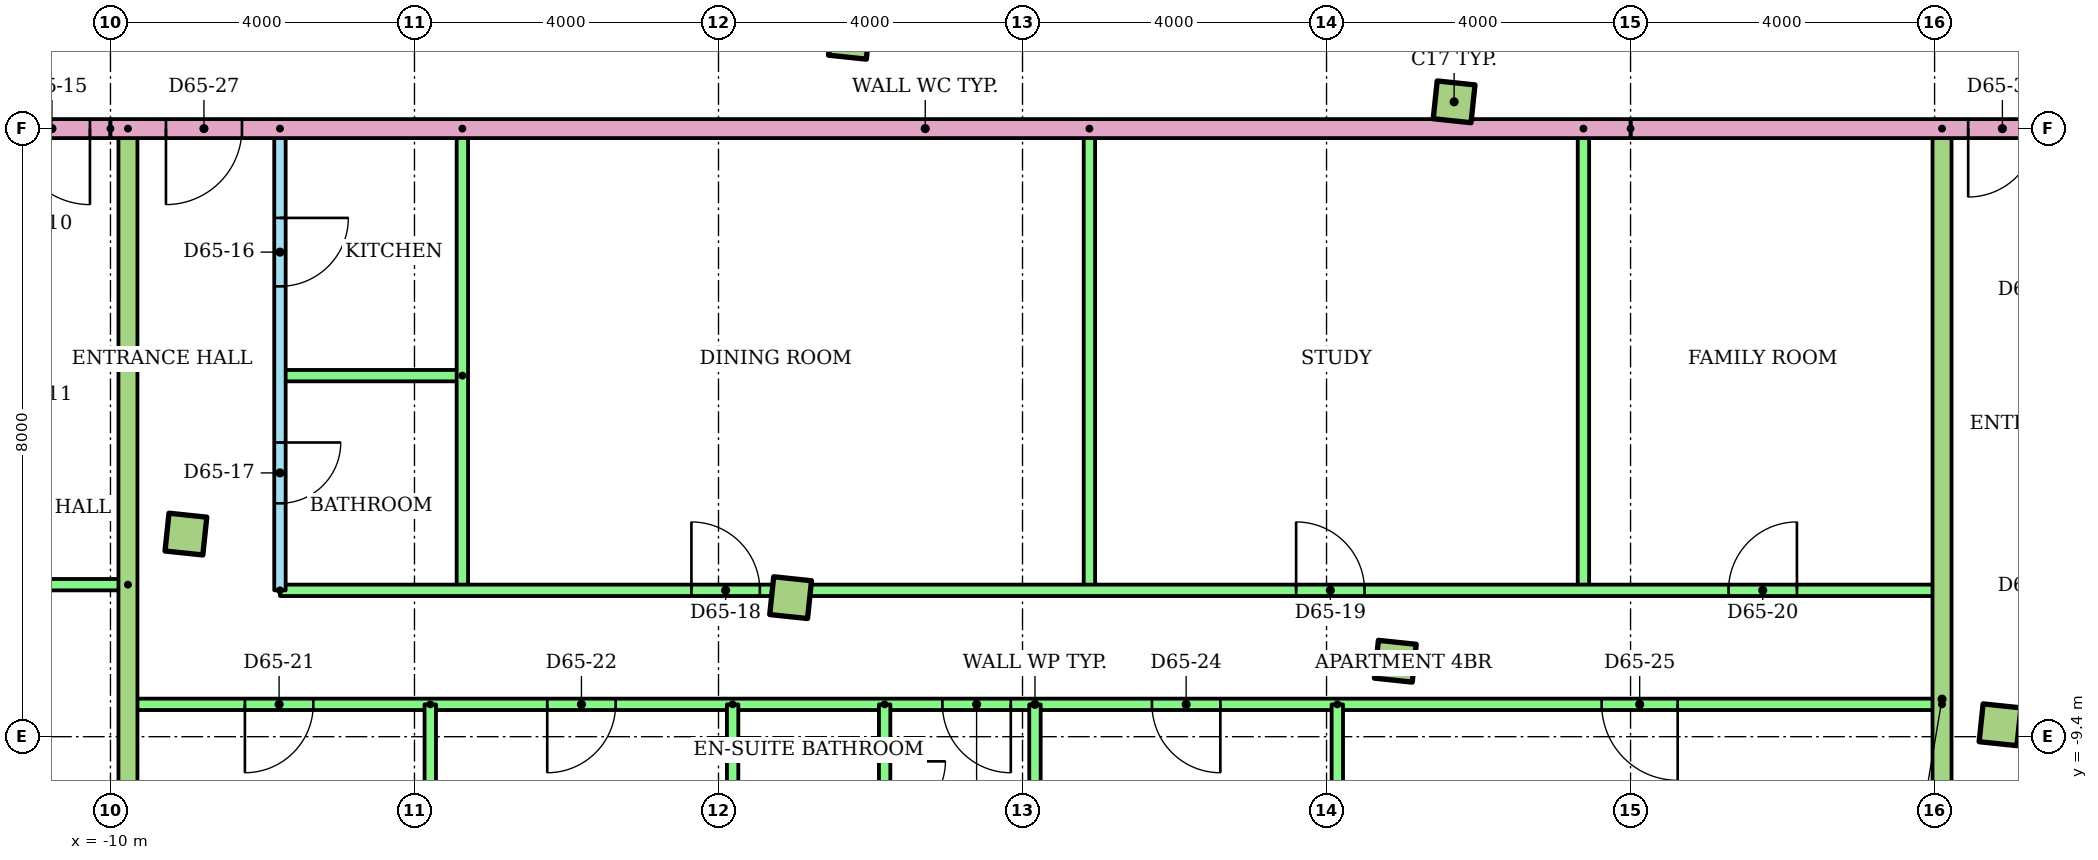
"""IFC4 building model, lengths in metres.
Left out: names, types, materials, properties, quantities, classifications, styles, units other than length and angle.
Written with IfcOpenShell. Run it as: python <this file> out.ifc"""

import sys

from ifc_helpers import new_model, si_unit, direction, frame, frame_2d, origin, origin_2d, place, context, subcontext, project, spatial, rectangle, extrude, element, fill, save


model = new_model("IFC4")
c1 = context("Model", 3, precision=1e-05, world=origin(), true_north=direction((0.0, 1.0)))
c2 = subcontext(c1, "Body", "Model", "MODEL_VIEW")
j1 = project(units=[si_unit("LENGTHUNIT", "METRE"), si_unit("PLANEANGLEUNIT", "RADIAN")], contexts=[c1])
p1 = place(None, origin())
s1 = spatial("IfcSite", under=j1, at=p1, CompositionType="ELEMENT")
p2 = place(p1, origin())
s2 = spatial("IfcBuilding", under=s1, at=p2, CompositionType="ELEMENT")
p3 = place(p2, frame((0.0, 0.0, 253.1)))
s3 = spatial("IfcBuildingStorey", under=s2, at=p3, CompositionType="ELEMENT", Elevation=253.1)
for number, where, z_axis, x_axis in (
    (1, (-9.007, -6.735, 0.0), (0.0, 0.0, 1.0), (0.995, -0.105, 0.0)),
    (2, (-1.051, -7.571, 0.0), (0.0, 0.0, 1.0), (0.995, -0.105, 0.0)),
    (3, (6.905, -8.407, 0.0), (0.0, 0.0, 1.0), (0.995, -0.105, 0.0)),
    (4, (14.861, -9.243, 0.0), (0.0, 0.0, 1.0), (0.995, -0.105, 0.0)),
    (5, (-0.278, -0.211, 0.0), (0.0, 0.0, 1.0), (0.995, -0.105, 0.0)),
    (6, (7.678, -1.048, 0.0), (0.0, 0.0, 1.0), (0.995, -0.105, 0.0)),
):
    element("IfcColumn", number, at=place(p3, frame(where, z_axis=z_axis, x_axis=x_axis)), inside=s3, PredefinedType="COLUMN", context=c2, shape_type="SweptSolid", body=[
        extrude(rectangle(XDim=0.5, YDim=0.5, at=origin_2d()), origin(), (0.0, 0.0, 1.0), 3.2),
    ])
p4 = place(p3, frame((-9.77, -7.4, 0.0), z_axis=(0.0, 0.0, 1.0), x_axis=(-1.0, 0.0, 0.0)))
e7 = element("IfcWall", 7, at=p4, inside=s3, PredefinedType="PARTITIONING", context=c2, shape_type="SweptSolid", body=[
    extrude(rectangle(XDim=14.411, YDim=0.15, at=frame_2d((7.206, 0.0))), origin(), (0.0, 0.0, 1.0), 2.4),
])
p5 = place(p4, frame((5.789, 0.0, 0.0)))
e8 = element("IfcOpeningElement", 8, at=p5, cuts=e7, PredefinedType="OPENING", context=c2, shape_type="SweptSolid", body=[
    extrude(rectangle(XDim=1.0, YDim=2.1, at=frame_2d((0.5, 1.05))), frame((0.0, 0.085, 0.0), z_axis=(0.0, -1.0, 0.0), x_axis=(1.0, 0.0, 0.0)), (0.0, 0.0, 1.0), 0.17),
])
p6 = place(p3, frame((-7.77, -1.4, 0.0), z_axis=(0.0, 0.0, 1.0), x_axis=(0.0, -1.0, 0.0)))
e9 = element("IfcWall", 9, at=p6, inside=s3, PredefinedType="PARTITIONING", context=c2, shape_type="SweptSolid", body=[
    extrude(rectangle(XDim=6.075, YDim=0.15, at=frame_2d((3.037, 0.0))), origin(), (0.0, 0.0, 1.0), 2.4),
])
p7 = place(p6, frame((1.175, 0.0, 0.0)))
e10 = element("IfcOpeningElement", 10, at=p7, cuts=e9, PredefinedType="OPENING", context=c2, shape_type="SweptSolid", body=[
    extrude(rectangle(XDim=0.9, YDim=2.1, at=frame_2d((0.45, 1.05))), frame((0.0, 0.085, 0.0), z_axis=(0.0, -1.0, 0.0), x_axis=(1.0, 0.0, 0.0)), (0.0, 0.0, 1.0), 0.17),
])
p8 = place(p6, frame((4.13, 0.0, 0.0)))
e11 = element("IfcOpeningElement", 11, at=p8, cuts=e9, PredefinedType="OPENING", context=c2, shape_type="SweptSolid", body=[
    extrude(rectangle(XDim=0.8, YDim=2.1, at=frame_2d((0.4, 1.05))), frame((0.0, 0.085, 0.0), z_axis=(0.0, -1.0, 0.0), x_axis=(1.0, 0.0, 0.0)), (0.0, 0.0, 1.0), 0.17),
])
p9 = place(p3, frame((-5.37, -4.65, 0.0), z_axis=(0.0, 0.0, 1.0), x_axis=(-1.0, 0.0, 0.0)))
e12 = element("IfcWall", 12, at=p9, inside=s3, PredefinedType="PARTITIONING", context=c2, shape_type="SweptSolid", body=[
    extrude(rectangle(XDim=2.4, YDim=0.15, at=frame_2d((1.2, 0.0))), origin(), (0.0, 0.0, 1.0), 2.4),
])
for number, where, z_axis, x_axis in (
    (13, (-5.37, -1.4, 0.0), (0.0, 0.0, 1.0), (0.0, -1.0, 0.0)),
    (14, (2.88, -1.4, 0.0), (0.0, 0.0, 1.0), (0.0, -1.0, 0.0)),
    (15, (9.38, -1.4, 0.0), (0.0, 0.0, 1.0), (0.0, -1.0, 0.0)),
):
    element("IfcWall", number, at=place(p3, frame(where, z_axis=z_axis, x_axis=x_axis)), inside=s3, PredefinedType="PARTITIONING", context=c2, shape_type="SweptSolid", body=[
        extrude(rectangle(XDim=6.075, YDim=0.15, at=frame_2d((3.037, 0.0))), origin(), (0.0, 0.0, 1.0), 2.4),
    ])
p10 = place(p3, frame((-7.77, -7.475, 0.0)))
e16 = element("IfcWall", 16, at=p10, inside=s3, PredefinedType="PARTITIONING", context=c2, shape_type="SweptSolid", body=[
    extrude(rectangle(XDim=21.868, YDim=0.15, at=frame_2d((10.934, 0.0))), origin(), (0.0, 0.0, 1.0), 2.4),
])
p11 = place(p10, frame((5.414, 0.0, 0.0)))
e17 = element("IfcOpeningElement", 17, at=p11, cuts=e16, PredefinedType="OPENING", context=c2, shape_type="SweptSolid", body=[
    extrude(rectangle(XDim=0.9, YDim=2.1, at=frame_2d((0.45, 1.05))), frame((0.0, 0.085, 0.0), z_axis=(0.0, -1.0, 0.0), x_axis=(1.0, 0.0, 0.0)), (0.0, 0.0, 1.0), 0.17),
])
p12 = place(p10, frame((13.37, 0.0, 0.0)))
e18 = element("IfcOpeningElement", 18, at=p12, cuts=e16, PredefinedType="OPENING", context=c2, shape_type="SweptSolid", body=[
    extrude(rectangle(XDim=0.9, YDim=2.1, at=frame_2d((0.45, 1.05))), frame((0.0, 0.085, 0.0), z_axis=(0.0, -1.0, 0.0), x_axis=(1.0, 0.0, 0.0)), (0.0, 0.0, 1.0), 0.17),
])
p13 = place(p10, frame((19.059, 0.0, 0.0)))
e19 = element("IfcOpeningElement", 19, at=p13, cuts=e16, PredefinedType="OPENING", context=c2, shape_type="SweptSolid", body=[
    extrude(rectangle(XDim=0.9, YDim=2.1, at=frame_2d((0.45, 1.05))), frame((0.0, 0.085, 0.0), z_axis=(0.0, -1.0, 0.0), x_axis=(1.0, 0.0, 0.0)), (0.0, 0.0, 1.0), 0.17),
])
p14 = place(p3, frame((14.098, -8.975, 0.0), z_axis=(0.0, 0.0, 1.0), x_axis=(-1.0, 0.0, 0.0)))
e20 = element("IfcWall", 20, at=p14, inside=s3, PredefinedType="PARTITIONING", context=c2, shape_type="SweptSolid", body=[
    extrude(rectangle(XDim=23.868, YDim=0.15, at=frame_2d((11.934, 0.0))), origin(), (0.0, 0.0, 1.0), 2.4),
])
p15 = place(p14, frame((21.429, 0.0, 0.0)))
e21 = element("IfcOpeningElement", 21, at=p15, cuts=e20, PredefinedType="OPENING", context=c2, shape_type="SweptSolid", body=[
    extrude(rectangle(XDim=0.9, YDim=2.1, at=frame_2d((0.45, 1.05))), frame((0.0, 0.085, 0.0), z_axis=(0.0, -1.0, 0.0), x_axis=(1.0, 0.0, 0.0)), (0.0, 0.0, 1.0), 0.17),
])
p16 = place(p14, frame((17.451, 0.0, 0.0)))
e22 = element("IfcOpeningElement", 22, at=p16, cuts=e20, PredefinedType="OPENING", context=c2, shape_type="SweptSolid", body=[
    extrude(rectangle(XDim=0.9, YDim=2.1, at=frame_2d((0.45, 1.05))), frame((0.0, 0.085, 0.0), z_axis=(0.0, -1.0, 0.0), x_axis=(1.0, 0.0, 0.0)), (0.0, 0.0, 1.0), 0.17),
])
p17 = place(p14, frame((12.252, 0.0, 0.0)))
e23 = element("IfcOpeningElement", 23, at=p17, cuts=e20, PredefinedType="OPENING", context=c2, shape_type="SweptSolid", body=[
    extrude(rectangle(XDim=0.9, YDim=2.1, at=frame_2d((0.45, 1.05))), frame((0.0, 0.085, 0.0), z_axis=(0.0, -1.0, 0.0), x_axis=(1.0, 0.0, 0.0)), (0.0, 0.0, 1.0), 0.17),
])
p18 = place(p14, frame((9.495, 0.0, 0.0)))
e24 = element("IfcOpeningElement", 24, at=p18, cuts=e20, PredefinedType="OPENING", context=c2, shape_type="SweptSolid", body=[
    extrude(rectangle(XDim=0.9, YDim=2.1, at=frame_2d((0.45, 1.05))), frame((0.0, 0.085, 0.0), z_axis=(0.0, -1.0, 0.0), x_axis=(1.0, 0.0, 0.0)), (0.0, 0.0, 1.0), 0.17),
])
p19 = place(p14, frame((3.478, 0.0, 0.0)))
e25 = element("IfcOpeningElement", 25, at=p19, cuts=e20, PredefinedType="OPENING", context=c2, shape_type="SweptSolid", body=[
    extrude(rectangle(XDim=1.0, YDim=2.1, at=frame_2d((0.5, 1.05))), frame((0.0, 0.085, 0.0), z_axis=(0.0, -1.0, 0.0), x_axis=(1.0, 0.0, 0.0)), (0.0, 0.0, 1.0), 0.17),
])
p20 = place(p3, frame((-5.792, -8.975, 0.0), z_axis=(0.0, 0.0, 1.0), x_axis=(0.0, -1.0, 0.0)))
e26 = element("IfcWall", 26, at=p20, inside=s3, PredefinedType="PARTITIONING", context=c2, shape_type="SweptSolid", body=[
    extrude(rectangle(XDim=5.359, YDim=0.15, at=frame_2d((2.679, 0.0))), origin(), (0.0, 0.0, 1.0), 2.4),
])
p21 = place(p3, frame((-1.814, -8.975, 0.0), z_axis=(0.0, 0.0, 1.0), x_axis=(0.0, -1.0, 0.0)))
e27 = element("IfcWall", 27, at=p21, inside=s3, PredefinedType="PARTITIONING", context=c2, shape_type="SweptSolid", body=[
    extrude(rectangle(XDim=5.766, YDim=0.15, at=frame_2d((2.883, 0.0))), origin(), (0.0, 0.0, 1.0), 2.4),
])
p22 = place(p3, frame((2.164, -8.975, 0.0), z_axis=(0.0, 0.0, 1.0), x_axis=(0.0, -1.0, 0.0)))
e28 = element("IfcWall", 28, at=p22, inside=s3, PredefinedType="PARTITIONING", context=c2, shape_type="SweptSolid", body=[
    extrude(rectangle(XDim=6.195, YDim=0.15, at=frame_2d((3.097, 0.0))), origin(), (0.0, 0.0, 1.0), 2.4),
])
p23 = place(p3, frame((6.142, -8.975, 0.0), z_axis=(0.0, 0.0, 1.0), x_axis=(0.0, -1.0, 0.0)))
e29 = element("IfcWall", 29, at=p23, inside=s3, PredefinedType="PARTITIONING", context=c2, shape_type="SweptSolid", body=[
    extrude(rectangle(XDim=6.602, YDim=0.15, at=frame_2d((3.301, 0.0))), origin(), (0.0, 0.0, 1.0), 2.4),
])
p24 = place(p3, frame((0.186, -8.975, 0.0), z_axis=(0.0, 0.0, 1.0), x_axis=(0.0, -1.0, 0.0)))
e30 = element("IfcWall", 30, at=p24, inside=s3, PredefinedType="PARTITIONING", context=c2, shape_type="SweptSolid", body=[
    extrude(rectangle(XDim=2.3, YDim=0.15, at=frame_2d((1.15, 0.0))), origin(), (0.0, 0.0, 1.0), 2.4),
])
p25 = place(p24, frame((0.75, 0.0, 0.0)))
e31 = element("IfcOpeningElement", 31, at=p25, cuts=e30, PredefinedType="OPENING", context=c2, shape_type="SweptSolid", body=[
    extrude(rectangle(XDim=0.8, YDim=2.1, at=frame_2d((0.4, 1.05))), frame((0.0, 0.085, 0.0), z_axis=(0.0, -1.0, 0.0), x_axis=(1.0, 0.0, 0.0)), (0.0, 0.0, 1.0), 0.17),
])
p26 = place(p3, frame((-9.77, -1.4, 0.0), z_axis=(0.0, 0.0, 1.0), x_axis=(0.0, -1.0, 0.0)))
e32 = element("IfcWall", 32, at=p26, inside=s3, PredefinedType="PARTITIONING", context=c2, shape_type="SweptSolid", body=[
    extrude(rectangle(XDim=12.504, YDim=0.25, at=frame_2d((6.252, 0.0))), origin(), (0.0, 0.0, 1.0), 2.4),
])
p27 = place(p3, frame((14.098, -1.4, 0.0), z_axis=(0.0, 0.0, 1.0), x_axis=(0.0, -1.0, 0.0)))
e33 = element("IfcWall", 33, at=p27, inside=s3, PredefinedType="PARTITIONING", context=c2, shape_type="SweptSolid", body=[
    extrude(rectangle(XDim=15.013, YDim=0.25, at=frame_2d((7.506, 0.0))), origin(), (0.0, 0.0, 1.0), 2.4),
])
p28 = place(p3, frame((-10.0, -1.4, 0.0), z_axis=(0.0, 0.0, 1.0), x_axis=(-1.0, 0.0, 0.0)))
e34 = element("IfcWall", 34, at=p28, inside=s3, PredefinedType="PARTITIONING", context=c2, shape_type="SweptSolid", body=[
    extrude(rectangle(XDim=13.56, YDim=0.25, at=frame_2d((6.78, 0.0))), origin(), (0.0, 0.0, 1.0), 2.4),
])
p29 = place(p28, frame((0.27, 0.0, 0.0)))
e35 = element("IfcOpeningElement", 35, at=p29, cuts=e34, PredefinedType="OPENING", context=c2, shape_type="SweptSolid", body=[
    extrude(rectangle(XDim=1.0, YDim=2.1, at=frame_2d((0.5, 1.05))), frame((0.0, 0.135, 0.0), z_axis=(0.0, -1.0, 0.0), x_axis=(1.0, 0.0, 0.0)), (0.0, 0.0, 1.0), 0.27),
])
p30 = place(p3, frame((25.0, -1.4, 0.0), z_axis=(0.0, 0.0, 1.0), x_axis=(-1.0, 0.0, 0.0)))
e36 = element("IfcWall", 36, at=p30, inside=s3, PredefinedType="PARTITIONING", context=c2, shape_type="SweptSolid", body=[
    extrude(rectangle(XDim=15.0, YDim=0.25, at=frame_2d((7.5, 0.0))), origin(), (0.0, 0.0, 1.0), 2.4),
])
p31 = place(p30, frame((9.658, 0.0, 0.0)))
e37 = element("IfcOpeningElement", 37, at=p31, cuts=e36, PredefinedType="OPENING", context=c2, shape_type="SweptSolid", body=[
    extrude(rectangle(XDim=0.9, YDim=2.1, at=frame_2d((0.45, 1.05))), frame((0.0, 0.135, 0.0), z_axis=(0.0, -1.0, 0.0), x_axis=(1.0, 0.0, 0.0)), (0.0, 0.0, 1.0), 0.27),
])
p32 = place(p3, frame((10.0, -1.4, 0.0), z_axis=(0.0, 0.0, 1.0), x_axis=(-1.0, 0.0, 0.0)))
e38 = element("IfcWall", 38, at=p32, inside=s3, PredefinedType="PARTITIONING", context=c2, shape_type="SweptSolid", body=[
    extrude(rectangle(XDim=20.0, YDim=0.25, at=frame_2d((10.0, 0.0))), origin(), (0.0, 0.0, 1.0), 2.4),
])
p33 = place(p32, frame((18.27, 0.0, 0.0)))
e39 = element("IfcOpeningElement", 39, at=p33, cuts=e38, PredefinedType="OPENING", context=c2, shape_type="SweptSolid", body=[
    extrude(rectangle(XDim=1.0, YDim=2.1, at=frame_2d((0.5, 1.05))), frame((0.0, 0.135, 0.0), z_axis=(0.0, -1.0, 0.0), x_axis=(1.0, 0.0, 0.0)), (0.0, 0.0, 1.0), 0.27),
])
p34 = place(p29, origin())
e40 = element("IfcDoor", 40, at=p34, inside=s3, OperationType="SINGLE_SWING_LEFT", PredefinedType="DOOR", context=c2, shape_type="SweptSolid", body=[
    extrude(rectangle(XDim=1.0, YDim=2.1, at=frame_2d((0.5, 1.05))), frame((0.0, 0.025, 0.0), z_axis=(0.0, -1.0, 0.0), x_axis=(1.0, 0.0, 0.0)), (0.0, 0.0, 1.0), 0.05),
])
fill(e35, e40)
p35 = place(p7, origin())
e41 = element("IfcDoor", 41, at=p35, inside=s3, OperationType="SINGLE_SWING_LEFT", PredefinedType="DOOR", context=c2, shape_type="SweptSolid", body=[
    extrude(rectangle(XDim=0.9, YDim=2.1, at=frame_2d((0.45, 1.05))), frame((0.0, 0.025, 0.0), z_axis=(0.0, -1.0, 0.0), x_axis=(1.0, 0.0, 0.0)), (0.0, 0.0, 1.0), 0.05),
])
fill(e10, e41)
p36 = place(p8, origin())
e42 = element("IfcDoor", 42, at=p36, inside=s3, OperationType="SINGLE_SWING_LEFT", PredefinedType="DOOR", context=c2, shape_type="SweptSolid", body=[
    extrude(rectangle(XDim=0.8, YDim=2.1, at=frame_2d((0.4, 1.05))), frame((0.0, 0.025, 0.0), z_axis=(0.0, -1.0, 0.0), x_axis=(1.0, 0.0, 0.0)), (0.0, 0.0, 1.0), 0.05),
])
fill(e11, e42)
p37 = place(p11, origin())
e43 = element("IfcDoor", 43, at=p37, inside=s3, OperationType="SINGLE_SWING_LEFT", PredefinedType="DOOR", context=c2, shape_type="SweptSolid", body=[
    extrude(rectangle(XDim=0.9, YDim=2.1, at=frame_2d((0.45, 1.05))), frame((0.0, 0.025, 0.0), z_axis=(0.0, -1.0, 0.0), x_axis=(1.0, 0.0, 0.0)), (0.0, 0.0, 1.0), 0.05),
])
fill(e17, e43)
p38 = place(p12, origin())
e44 = element("IfcDoor", 44, at=p38, inside=s3, OperationType="SINGLE_SWING_LEFT", PredefinedType="DOOR", context=c2, shape_type="SweptSolid", body=[
    extrude(rectangle(XDim=0.9, YDim=2.1, at=frame_2d((0.45, 1.05))), frame((0.0, 0.025, 0.0), z_axis=(0.0, -1.0, 0.0), x_axis=(1.0, 0.0, 0.0)), (0.0, 0.0, 1.0), 0.05),
])
fill(e18, e44)
p39 = place(p13, origin())
e45 = element("IfcDoor", 45, at=p39, inside=s3, OperationType="SINGLE_SWING_RIGHT", PredefinedType="DOOR", context=c2, shape_type="SweptSolid", body=[
    extrude(rectangle(XDim=0.9, YDim=2.1, at=frame_2d((0.45, 1.05))), frame((0.0, 0.025, 0.0), z_axis=(0.0, -1.0, 0.0), x_axis=(1.0, 0.0, 0.0)), (0.0, 0.0, 1.0), 0.05),
])
fill(e19, e45)
p40 = place(p15, origin())
e46 = element("IfcDoor", 46, at=p40, inside=s3, OperationType="SINGLE_SWING_RIGHT", PredefinedType="DOOR", context=c2, shape_type="SweptSolid", body=[
    extrude(rectangle(XDim=0.9, YDim=2.1, at=frame_2d((0.45, 1.05))), frame((0.0, 0.025, 0.0), z_axis=(0.0, -1.0, 0.0), x_axis=(1.0, 0.0, 0.0)), (0.0, 0.0, 1.0), 0.05),
])
fill(e21, e46)
p41 = place(p16, origin())
e47 = element("IfcDoor", 47, at=p41, inside=s3, OperationType="SINGLE_SWING_RIGHT", PredefinedType="DOOR", context=c2, shape_type="SweptSolid", body=[
    extrude(rectangle(XDim=0.9, YDim=2.1, at=frame_2d((0.45, 1.05))), frame((0.0, 0.025, 0.0), z_axis=(0.0, -1.0, 0.0), x_axis=(1.0, 0.0, 0.0)), (0.0, 0.0, 1.0), 0.05),
])
fill(e22, e47)
p42 = place(p17, origin())
e48 = element("IfcDoor", 48, at=p42, inside=s3, OperationType="SINGLE_SWING_LEFT", PredefinedType="DOOR", context=c2, shape_type="SweptSolid", body=[
    extrude(rectangle(XDim=0.9, YDim=2.1, at=frame_2d((0.45, 1.05))), frame((0.0, 0.025, 0.0), z_axis=(0.0, -1.0, 0.0), x_axis=(1.0, 0.0, 0.0)), (0.0, 0.0, 1.0), 0.05),
])
fill(e23, e48)
p43 = place(p18, origin())
e49 = element("IfcDoor", 49, at=p43, inside=s3, OperationType="SINGLE_SWING_LEFT", PredefinedType="DOOR", context=c2, shape_type="SweptSolid", body=[
    extrude(rectangle(XDim=0.9, YDim=2.1, at=frame_2d((0.45, 1.05))), frame((0.0, 0.025, 0.0), z_axis=(0.0, -1.0, 0.0), x_axis=(1.0, 0.0, 0.0)), (0.0, 0.0, 1.0), 0.05),
])
fill(e24, e49)
p44 = place(p19, origin())
e50 = element("IfcDoor", 50, at=p44, inside=s3, OperationType="SINGLE_SWING_LEFT", PredefinedType="DOOR", context=c2, shape_type="SweptSolid", body=[
    extrude(rectangle(XDim=1.0, YDim=2.1, at=frame_2d((0.5, 1.05))), frame((0.0, 0.025, 0.0), z_axis=(0.0, -1.0, 0.0), x_axis=(1.0, 0.0, 0.0)), (0.0, 0.0, 1.0), 0.05),
])
fill(e25, e50)
p45 = place(p25, origin())
e51 = element("IfcDoor", 51, at=p45, inside=s3, OperationType="SINGLE_SWING_LEFT", PredefinedType="DOOR", context=c2, shape_type="SweptSolid", body=[
    extrude(rectangle(XDim=0.8, YDim=2.1, at=frame_2d((0.4, 1.05))), frame((0.0, 0.025, 0.0), z_axis=(0.0, -1.0, 0.0), x_axis=(1.0, 0.0, 0.0)), (0.0, 0.0, 1.0), 0.05),
])
fill(e31, e51)
p46 = place(p33, origin())
e52 = element("IfcDoor", 52, at=p46, inside=s3, OperationType="SINGLE_SWING_RIGHT", PredefinedType="DOOR", context=c2, shape_type="SweptSolid", body=[
    extrude(rectangle(XDim=1.0, YDim=2.1, at=frame_2d((0.5, 1.05))), frame((0.0, 0.025, 0.0), z_axis=(0.0, -1.0, 0.0), x_axis=(1.0, 0.0, 0.0)), (0.0, 0.0, 1.0), 0.05),
])
fill(e39, e52)
p47 = place(p31, origin())
e53 = element("IfcDoor", 53, at=p47, inside=s3, OperationType="SINGLE_SWING_RIGHT", PredefinedType="DOOR", context=c2, shape_type="SweptSolid", body=[
    extrude(rectangle(XDim=0.9, YDim=2.1, at=frame_2d((0.45, 1.05))), frame((0.0, 0.025, 0.0), z_axis=(0.0, -1.0, 0.0), x_axis=(1.0, 0.0, 0.0)), (0.0, 0.0, 1.0), 0.05),
])
fill(e37, e53)
save(model, sys.argv[1])
